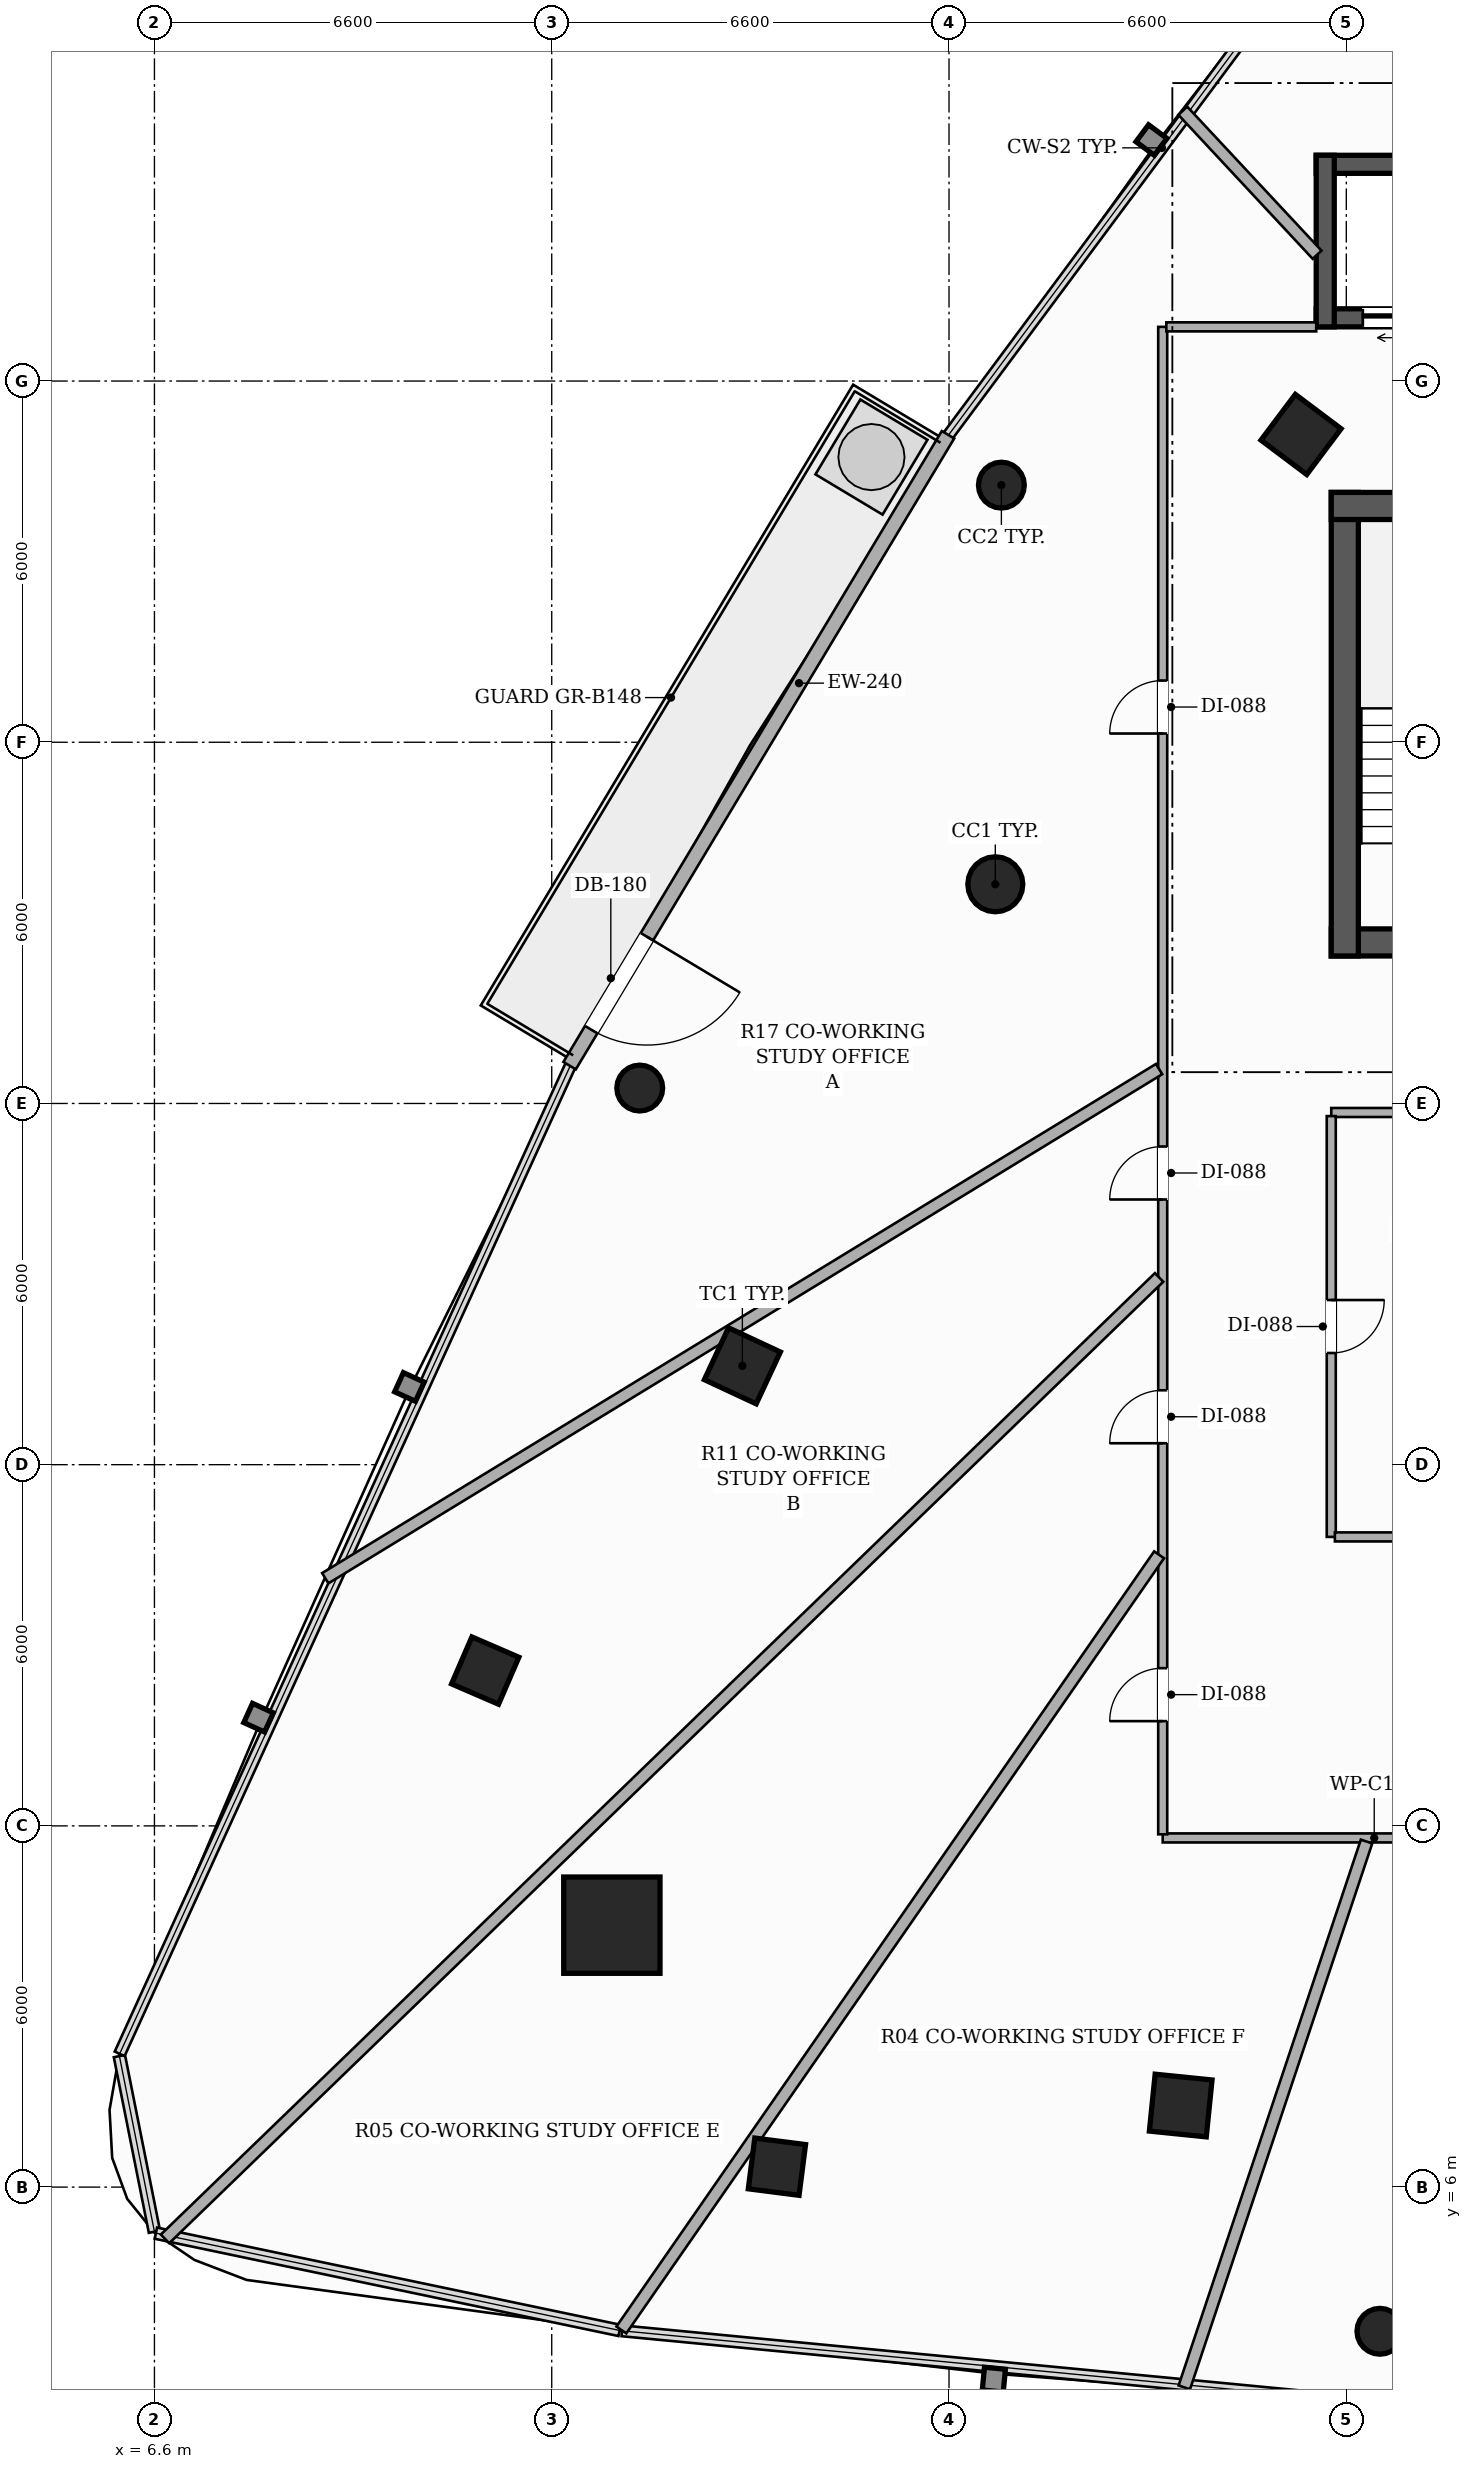
"""IFC4 building model, lengths in metres.
Left out: names, types, materials, properties, quantities, classifications, styles, units other than length and angle.
Written with IfcOpenShell. Run it as: python <this file> out.ifc"""

import sys

from ifc_helpers import new_model, si_unit, direction, frame, frame_2d, origin, origin_2d, place, context, subcontext, project, spatial, rectangle, hollow_rectangle, hollow_circle, extrude, element, fill, save


model = new_model("IFC4")
c1 = context("Model", 3, precision=1e-05, world=origin(), true_north=direction((0.0, 1.0)))
c2 = subcontext(c1, "Body", "Model", "MODEL_VIEW")
j1 = project(units=[si_unit("LENGTHUNIT", "METRE"), si_unit("PLANEANGLEUNIT", "RADIAN")], contexts=[c1])
p1 = place(None, origin())
s1 = spatial("IfcSite", under=j1, at=p1, CompositionType="ELEMENT")
p2 = place(p1, origin())
s2 = spatial("IfcBuilding", under=s1, at=p2, CompositionType="ELEMENT")
p3 = place(p2, frame((0.0, 0.0, 90.65)))
s3 = spatial("IfcBuildingStorey", under=s2, at=p3, CompositionType="ELEMENT", Elevation=90.65)
p4 = place(p3, frame((26.15, 26.675, 0.0), z_axis=(0.0, 0.0, 1.0), x_axis=(1.0, 0.0, 0.0)))
e1 = element("IfcWall", 1, at=p4, inside=s3, PredefinedType="SHEAR", context=c2, shape_type="SweptSolid", body=[
    extrude(rectangle(XDim=13.7, YDim=0.45, at=frame_2d((6.85, 0.0))), origin(), (0.0, 0.0, 1.0), 3.3),
])
p5 = place(p4, frame((4.35, 0.0, 0.0)))
e2 = element("IfcOpeningElement", 2, at=p5, cuts=e1, PredefinedType="OPENING", context=c2, shape_type="SweptSolid", body=[
    extrude(rectangle(XDim=1.05, YDim=2.15, at=frame_2d((0.525, 1.075))), frame((0.0, 0.235, 0.0), z_axis=(0.0, -1.0, 0.0), x_axis=(1.0, 0.0, 0.0)), (0.0, 0.0, 1.0), 0.47),
])
p6 = place(p4, frame((8.3, 0.0, 0.0)))
e3 = element("IfcOpeningElement", 3, at=p6, cuts=e1, PredefinedType="OPENING", context=c2, shape_type="SweptSolid", body=[
    extrude(rectangle(XDim=1.05, YDim=2.15, at=frame_2d((0.525, 1.075))), frame((0.0, 0.235, 0.0), z_axis=(0.0, -1.0, 0.0), x_axis=(1.0, 0.0, 0.0)), (0.0, 0.0, 1.0), 0.47),
])
p7 = place(p3, frame((26.375, 26.45, 0.0), z_axis=(0.0, 0.0, 1.0), x_axis=(0.0, 1.0, 0.0)))
e4 = element("IfcWall", 4, at=p7, inside=s3, PredefinedType="SHEAR", context=c2, shape_type="SweptSolid", body=[
    extrude(rectangle(XDim=7.7, YDim=0.45, at=frame_2d((3.85, 0.0))), origin(), (0.0, 0.0, 1.0), 3.3),
])
p8 = place(p3, frame((26.15, 33.925, 0.0), z_axis=(0.0, 0.0, 1.0), x_axis=(1.0, 0.0, 0.0)))
e5 = element("IfcWall", 5, at=p8, inside=s3, PredefinedType="SHEAR", context=c2, shape_type="SweptSolid", body=[
    extrude(rectangle(XDim=3.75, YDim=0.45, at=frame_2d((1.875, 0.0))), origin(), (0.0, 0.0, 1.0), 3.3),
])
p9 = place(p3, frame((40.1, 37.05, 0.0), z_axis=(0.0, 0.0, 1.0), x_axis=(-1.0, 0.0, 0.0)))
e6 = element("IfcWall", 6, at=p9, inside=s3, PredefinedType="SHEAR", context=c2, shape_type="SweptSolid", body=[
    extrude(rectangle(XDim=14.2, YDim=0.3, at=frame_2d((7.1, 0.0))), origin(), (0.0, 0.0, 1.0), 3.3),
])
p10 = place(p9, frame((12.325, 0.0, 0.0)))
e7 = element("IfcOpeningElement", 7, at=p10, cuts=e6, PredefinedType="OPENING", context=c2, shape_type="SweptSolid", body=[
    extrude(rectangle(XDim=1.1, YDim=2.2, at=frame_2d((0.55, 1.1))), frame((0.0, 0.16, 0.0), z_axis=(0.0, -1.0, 0.0), x_axis=(1.0, 0.0, 0.0)), (0.0, 0.0, 1.0), 0.32),
])
p11 = place(p9, frame((0.775, 0.0, 0.0)))
e8 = element("IfcOpeningElement", 8, at=p11, cuts=e6, PredefinedType="OPENING", context=c2, shape_type="SweptSolid", body=[
    extrude(rectangle(XDim=1.1, YDim=2.2, at=frame_2d((0.55, 1.1))), frame((0.0, 0.16, 0.0), z_axis=(0.0, -1.0, 0.0), x_axis=(1.0, 0.0, 0.0)), (0.0, 0.0, 1.0), 0.32),
])
p12 = place(p3, frame((25.9, 39.6, 0.0), z_axis=(0.0, 0.0, 1.0), x_axis=(1.0, 0.0, 0.0)))
e9 = element("IfcWall", 9, at=p12, inside=s3, PredefinedType="SHEAR", context=c2, shape_type="SweptSolid", body=[
    extrude(rectangle(XDim=14.2, YDim=0.3, at=frame_2d((7.1, 0.0))), origin(), (0.0, 0.0, 1.0), 3.3),
])
p13 = place(p3, frame((26.05, 36.9, 0.0), z_axis=(0.0, 0.0, 1.0), x_axis=(0.0, 1.0, 0.0)))
e10 = element("IfcWall", 10, at=p13, inside=s3, PredefinedType="SHEAR", context=c2, shape_type="SweptSolid", body=[
    extrude(rectangle(XDim=2.85, YDim=0.3, at=frame_2d((1.425, 0.0))), origin(), (0.0, 0.0, 1.0), 3.3),
])
p14 = place(p3, frame((14.199, 10.351, 0.0), z_axis=(0.0, 0.0, 1.0), x_axis=(1.0, 0.0, 0.0)))
e11 = element("IfcColumn", 11, at=p14, inside=s3, PredefinedType="COLUMN", context=c2, shape_type="SweptSolid", body=[
    extrude(hollow_rectangle(XDim=1.6, YDim=1.6, WallThickness=0.05, at=origin_2d()), origin(), (0.0, 0.0, 1.0), 3.3),
])
p15 = place(p3, frame((25.648, 35.113, 0.0), z_axis=(0.0, 0.0, 1.0), x_axis=(0.600420225326, 0.799684658487, 0.0)))
e12 = element("IfcColumn", 12, at=p15, inside=s3, PredefinedType="COLUMN", context=c2, shape_type="SweptSolid", body=[
    extrude(hollow_rectangle(XDim=0.95, YDim=0.95, WallThickness=0.032, at=origin_2d()), origin(), (0.0, 0.0, 1.0), 3.3),
])
p16 = place(p3, frame((20.569, 27.641, 0.0), z_axis=(0.0, 0.0, 1.0), x_axis=(1.0, 0.0, 0.0)))
e13 = element("IfcColumn", 13, at=p16, inside=s3, PredefinedType="COLUMN", context=c2, shape_type="SweptSolid", body=[
    extrude(hollow_circle(Radius=0.457, WallThickness=0.025, at=origin_2d()), origin(), (0.0, 0.0, 1.0), 3.3),
])
for number, where, z_axis, x_axis in (
    (14, (16.367, 19.642, 0.0), (0.0, 0.0, 1.0), (0.423, 0.906, 0.0)),
    (15, (23.649, 7.355, 0.0), (0.0, 0.0, 1.0), (-0.995, 0.101, 0.0)),
):
    element("IfcColumn", number, at=place(p3, frame(where, z_axis=z_axis, x_axis=x_axis)), inside=s3, PredefinedType="COLUMN", context=c2, shape_type="SweptSolid", body=[
        extrude(hollow_rectangle(XDim=0.95, YDim=0.95, WallThickness=0.032, at=origin_2d()), origin(), (0.0, 0.0, 1.0), 3.3),
    ])
for number, where, z_axis, x_axis in (
    (16, (12.095, 14.58, 0.0), (0.0, 0.0, 1.0), (0.397, 0.918, 0.0)),
    (17, (16.941, 6.339, 0.0), (0.0, 0.0, 1.0), (-0.992, 0.127, 0.0)),
):
    element("IfcColumn", number, at=place(p3, frame(where, z_axis=z_axis, x_axis=x_axis)), inside=s3, PredefinedType="COLUMN", context=c2, shape_type="SweptSolid", body=[
        extrude(hollow_rectangle(XDim=0.85, YDim=0.85, WallThickness=0.028, at=origin_2d()), origin(), (0.0, 0.0, 1.0), 3.3),
    ])
for number, where, z_axis, x_axis in (
    (18, (20.67, 34.271, 0.0), (0.0, 0.0, 1.0), (1.0, 0.0, 0.0)),
    (19, (14.662, 24.256, 0.0), (0.0, 0.0, 1.0), (1.0, 0.0, 0.0)),
    (20, (26.958, 3.605, 0.0), (0.0, 0.0, 1.0), (1.0, 0.0, 0.0)),
):
    element("IfcColumn", number, at=place(p3, frame(where, z_axis=z_axis, x_axis=x_axis)), inside=s3, PredefinedType="COLUMN", context=c2, shape_type="SweptSolid", body=[
        extrude(hollow_circle(Radius=0.381, WallThickness=0.022, at=origin_2d()), origin(), (0.0, 0.0, 1.0), 3.3),
    ])
p17 = place(p3, frame((19.783, 35.108, 0.0), z_axis=(0.0, 0.0, 1.0), x_axis=(-0.514369419392, -0.857568714678, 0.0)))
e21 = element("IfcWall", 21, at=p17, inside=s3, PredefinedType="SOLIDWALL", context=c2, shape_type="SweptSolid", body=[
    extrude(rectangle(XDim=12.22, YDim=0.24, at=frame_2d((6.11, 0.0))), origin(), (0.0, 0.0, 1.0), 2.624),
])
p18 = place(p17, frame((9.723, 0.0, 0.0)))
e22 = element("IfcOpeningElement", 22, at=p18, cuts=e21, PredefinedType="OPENING", context=c2, shape_type="SweptSolid", body=[
    extrude(rectangle(XDim=1.8, YDim=2.2, at=frame_2d((0.9, 1.1))), frame((0.0, 0.13, 0.0), z_axis=(0.0, -1.0, 0.0), x_axis=(1.0, 0.0, 0.0)), (0.0, 0.0, 1.0), 0.26),
])
p19 = place(p3, frame((42.59, 11.8, 0.0), z_axis=(0.0, 0.0, 1.0), x_axis=(-1.0, 0.0, 0.0)))
e23 = element("IfcWall", 23, at=p19, inside=s3, PredefinedType="PARTITIONING", context=c2, shape_type="SweptSolid", body=[
    extrude(rectangle(XDim=19.24, YDim=0.15, at=frame_2d((9.62, 0.0))), origin(), (0.0, 0.0, 1.0), 2.669),
])
p20 = place(p19, frame((11.192, 0.0, 0.0)))
e24 = element("IfcOpeningElement", 24, at=p20, cuts=e23, PredefinedType="OPENING", context=c2, shape_type="SweptSolid", body=[
    extrude(rectangle(XDim=0.92, YDim=2.15, at=frame_2d((0.46, 1.075))), frame((0.0, 0.085, 0.0), z_axis=(0.0, -1.0, 0.0), x_axis=(1.0, 0.0, 0.0)), (0.0, 0.0, 1.0), 0.17),
])
p21 = place(p19, frame((3.42, 0.0, 0.0)))
e25 = element("IfcOpeningElement", 25, at=p21, cuts=e23, PredefinedType="OPENING", context=c2, shape_type="SweptSolid", body=[
    extrude(rectangle(XDim=0.92, YDim=2.15, at=frame_2d((0.46, 1.075))), frame((0.0, 0.085, 0.0), z_axis=(0.0, -1.0, 0.0), x_axis=(1.0, 0.0, 0.0)), (0.0, 0.0, 1.0), 0.17),
])
p22 = place(p3, frame((23.35, 11.86, 0.0), z_axis=(0.0, 0.0, 1.0), x_axis=(0.0, 1.0, 0.0)))
e26 = element("IfcWall", 26, at=p22, inside=s3, PredefinedType="PARTITIONING", context=c2, shape_type="SweptSolid", body=[
    extrude(rectangle(XDim=25.04, YDim=0.15, at=frame_2d((12.52, 0.0))), origin(), (0.0, 0.0, 1.0), 2.413),
])
p23 = place(p22, frame((18.285, 0.0, 0.0)))
e27 = element("IfcOpeningElement", 27, at=p23, cuts=e26, PredefinedType="OPENING", context=c2, shape_type="SweptSolid", body=[
    extrude(rectangle(XDim=0.88, YDim=2.1, at=frame_2d((0.44, 1.05))), frame((0.0, 0.085, 0.0), z_axis=(0.0, -1.0, 0.0), x_axis=(1.0, 0.0, 0.0)), (0.0, 0.0, 1.0), 0.17),
])
p24 = place(p22, frame((10.545, 0.0, 0.0)))
e28 = element("IfcOpeningElement", 28, at=p24, cuts=e26, PredefinedType="OPENING", context=c2, shape_type="SweptSolid", body=[
    extrude(rectangle(XDim=0.88, YDim=2.1, at=frame_2d((0.44, 1.05))), frame((0.0, 0.085, 0.0), z_axis=(0.0, -1.0, 0.0), x_axis=(1.0, 0.0, 0.0)), (0.0, 0.0, 1.0), 0.17),
])
p25 = place(p22, frame((6.496, 0.0, 0.0)))
e29 = element("IfcOpeningElement", 29, at=p25, cuts=e26, PredefinedType="OPENING", context=c2, shape_type="SweptSolid", body=[
    extrude(rectangle(XDim=0.88, YDim=2.1, at=frame_2d((0.44, 1.05))), frame((0.0, 0.085, 0.0), z_axis=(0.0, -1.0, 0.0), x_axis=(1.0, 0.0, 0.0)), (0.0, 0.0, 1.0), 0.17),
])
p26 = place(p22, frame((1.88, 0.0, 0.0)))
e30 = element("IfcOpeningElement", 30, at=p26, cuts=e26, PredefinedType="OPENING", context=c2, shape_type="SweptSolid", body=[
    extrude(rectangle(XDim=0.88, YDim=2.1, at=frame_2d((0.44, 1.05))), frame((0.0, 0.085, 0.0), z_axis=(0.0, -1.0, 0.0), x_axis=(1.0, 0.0, 0.0)), (0.0, 0.0, 1.0), 0.17),
])
p27 = place(p3, frame((23.41, 36.9, 0.0), z_axis=(0.0, 0.0, 1.0), x_axis=(1.0, 0.0, 0.0)))
e31 = element("IfcWall", 31, at=p27, inside=s3, PredefinedType="PARTITIONING", context=c2, shape_type="SweptSolid", body=[
    extrude(rectangle(XDim=2.49, YDim=0.15, at=frame_2d((1.245, 0.0))), origin(), (0.0, 0.0, 1.0), 2.413),
])
p28 = place(p3, frame((31.706, 23.85, 0.0), z_axis=(0.0, 0.0, 1.0), x_axis=(-1.0, 0.0, 0.0)))
e32 = element("IfcWall", 32, at=p28, inside=s3, PredefinedType="PARTITIONING", context=c2, shape_type="SweptSolid", body=[
    extrude(rectangle(XDim=5.556, YDim=0.15, at=frame_2d((2.778, 0.0))), origin(), (0.0, 0.0, 1.0), 2.669),
])
p29 = place(p3, frame((26.15, 23.79, 0.0), z_axis=(0.0, 0.0, 1.0), x_axis=(0.0, -1.0, 0.0)))
e33 = element("IfcWall", 33, at=p29, inside=s3, PredefinedType="PARTITIONING", context=c2, shape_type="SweptSolid", body=[
    extrude(rectangle(XDim=6.99, YDim=0.15, at=frame_2d((3.495, 0.0))), origin(), (0.0, 0.0, 1.0), 2.669),
])
p30 = place(p29, frame((3.055, 0.0, 0.0)))
e34 = element("IfcOpeningElement", 34, at=p30, cuts=e33, PredefinedType="OPENING", context=c2, shape_type="SweptSolid", body=[
    extrude(rectangle(XDim=0.88, YDim=2.1, at=frame_2d((0.44, 1.05))), frame((0.0, 0.085, 0.0), z_axis=(0.0, -1.0, 0.0), x_axis=(1.0, 0.0, 0.0)), (0.0, 0.0, 1.0), 0.17),
])
p31 = place(p3, frame((26.21, 16.8, 0.0), z_axis=(0.0, 0.0, 1.0), x_axis=(1.0, 0.0, 0.0)))
e35 = element("IfcWall", 35, at=p31, inside=s3, PredefinedType="PARTITIONING", context=c2, shape_type="SweptSolid", body=[
    extrude(rectangle(XDim=1.186, YDim=0.15, at=frame_2d((0.593, 0.0))), origin(), (0.0, 0.0, 1.0), 3.06),
])
p32 = place(p3, frame((25.915, 38.098, 0.0), z_axis=(0.0, 0.0, 1.0), x_axis=(-0.682046951702, 0.731308386165, 0.0)))
e36 = element("IfcWall", 36, at=p32, inside=s3, PredefinedType="PARTITIONING", context=c2, shape_type="SweptSolid", body=[
    extrude(rectangle(XDim=3.271, YDim=0.2, at=frame_2d((1.635, 0.0))), origin(), (0.0, 0.0, 1.0), 3.06),
])
p33 = place(p3, frame((23.29, 24.571, 0.0), z_axis=(0.0, 0.0, 1.0), x_axis=(-0.85350412057, -0.521086092858, 0.0)))
e37 = element("IfcWall", 37, at=p33, inside=s3, PredefinedType="PARTITIONING", context=c2, shape_type="SweptSolid", body=[
    extrude(rectangle(XDim=16.23, YDim=0.2, at=frame_2d((8.115, 0.0))), origin(), (0.0, 0.0, 1.0), 2.413),
])
p34 = place(p3, frame((23.29, 21.11, 0.0), z_axis=(0.0, 0.0, 1.0), x_axis=(-0.718846392138, -0.695168946739, 0.0)))
e38 = element("IfcWall", 38, at=p34, inside=s3, PredefinedType="PARTITIONING", context=c2, shape_type="SweptSolid", body=[
    extrude(rectangle(XDim=22.973, YDim=0.2, at=frame_2d((11.487, 0.0))), origin(), (0.0, 0.0, 1.0), 2.413),
])
p35 = place(p3, frame((23.709, 2.673, 0.0), z_axis=(0.0, 0.0, 1.0), x_axis=(0.316679801448, 0.948532499894, 0.0)))
e39 = element("IfcWall", 39, at=p35, inside=s3, PredefinedType="PARTITIONING", context=c2, shape_type="SweptSolid", body=[
    extrude(rectangle(XDim=9.559, YDim=0.2, at=frame_2d((4.779, 0.0))), origin(), (0.0, 0.0, 1.0), 2.413),
])
p36 = place(p3, frame((23.29, 16.503, 0.0), z_axis=(0.0, 0.0, 1.0), x_axis=(-0.57002789499, -0.821625339759, 0.0)))
e40 = element("IfcWall", 40, at=p36, inside=s3, PredefinedType="PARTITIONING", context=c2, shape_type="SweptSolid", body=[
    extrude(rectangle(XDim=15.671, YDim=0.2, at=frame_2d((7.836, 0.0))), origin(), (0.0, 0.0, 1.0), 2.413),
])
p37 = place(p18, origin())
e41 = element("IfcDoor", 41, at=p37, inside=s3, OperationType="SINGLE_SWING_LEFT", PredefinedType="DOOR", context=c2, shape_type="SweptSolid", body=[
    extrude(rectangle(XDim=1.8, YDim=2.2, at=frame_2d((0.9, 1.1))), frame((0.0, 0.025, 0.0), z_axis=(0.0, -1.0, 0.0), x_axis=(1.0, 0.0, 0.0)), (0.0, 0.0, 1.0), 0.05),
])
fill(e22, e41)
p38 = place(p10, origin())
e42 = element("IfcDoor", 42, at=p38, inside=s3, OperationType="DOUBLE_DOOR_SLIDING", PredefinedType="DOOR", context=c2, shape_type="SweptSolid", body=[
    extrude(rectangle(XDim=1.1, YDim=2.2, at=frame_2d((0.55, 1.1))), frame((0.0, 0.025, 0.0), z_axis=(0.0, -1.0, 0.0), x_axis=(1.0, 0.0, 0.0)), (0.0, 0.0, 1.0), 0.05),
])
fill(e7, e42)
p39 = place(p23, origin())
e43 = element("IfcDoor", 43, at=p39, inside=s3, OperationType="SINGLE_SWING_LEFT", PredefinedType="DOOR", context=c2, shape_type="SweptSolid", body=[
    extrude(rectangle(XDim=0.88, YDim=2.1, at=frame_2d((0.44, 1.05))), frame((0.0, 0.025, 0.0), z_axis=(0.0, -1.0, 0.0), x_axis=(1.0, 0.0, 0.0)), (0.0, 0.0, 1.0), 0.05),
])
fill(e27, e43)
p40 = place(p24, origin())
e44 = element("IfcDoor", 44, at=p40, inside=s3, OperationType="SINGLE_SWING_LEFT", PredefinedType="DOOR", context=c2, shape_type="SweptSolid", body=[
    extrude(rectangle(XDim=0.88, YDim=2.1, at=frame_2d((0.44, 1.05))), frame((0.0, 0.025, 0.0), z_axis=(0.0, -1.0, 0.0), x_axis=(1.0, 0.0, 0.0)), (0.0, 0.0, 1.0), 0.05),
])
fill(e28, e44)
p41 = place(p25, origin())
e45 = element("IfcDoor", 45, at=p41, inside=s3, OperationType="SINGLE_SWING_LEFT", PredefinedType="DOOR", context=c2, shape_type="SweptSolid", body=[
    extrude(rectangle(XDim=0.88, YDim=2.1, at=frame_2d((0.44, 1.05))), frame((0.0, 0.025, 0.0), z_axis=(0.0, -1.0, 0.0), x_axis=(1.0, 0.0, 0.0)), (0.0, 0.0, 1.0), 0.05),
])
fill(e29, e45)
p42 = place(p26, origin())
e46 = element("IfcDoor", 46, at=p42, inside=s3, OperationType="SINGLE_SWING_LEFT", PredefinedType="DOOR", context=c2, shape_type="SweptSolid", body=[
    extrude(rectangle(XDim=0.88, YDim=2.1, at=frame_2d((0.44, 1.05))), frame((0.0, 0.025, 0.0), z_axis=(0.0, -1.0, 0.0), x_axis=(1.0, 0.0, 0.0)), (0.0, 0.0, 1.0), 0.05),
])
fill(e30, e46)
p43 = place(p30, origin())
e47 = element("IfcDoor", 47, at=p43, inside=s3, OperationType="SINGLE_SWING_LEFT", PredefinedType="DOOR", context=c2, shape_type="SweptSolid", body=[
    extrude(rectangle(XDim=0.88, YDim=2.1, at=frame_2d((0.44, 1.05))), frame((0.0, 0.025, 0.0), z_axis=(0.0, -1.0, 0.0), x_axis=(1.0, 0.0, 0.0)), (0.0, 0.0, 1.0), 0.05),
])
fill(e34, e47)
save(model, sys.argv[1])
